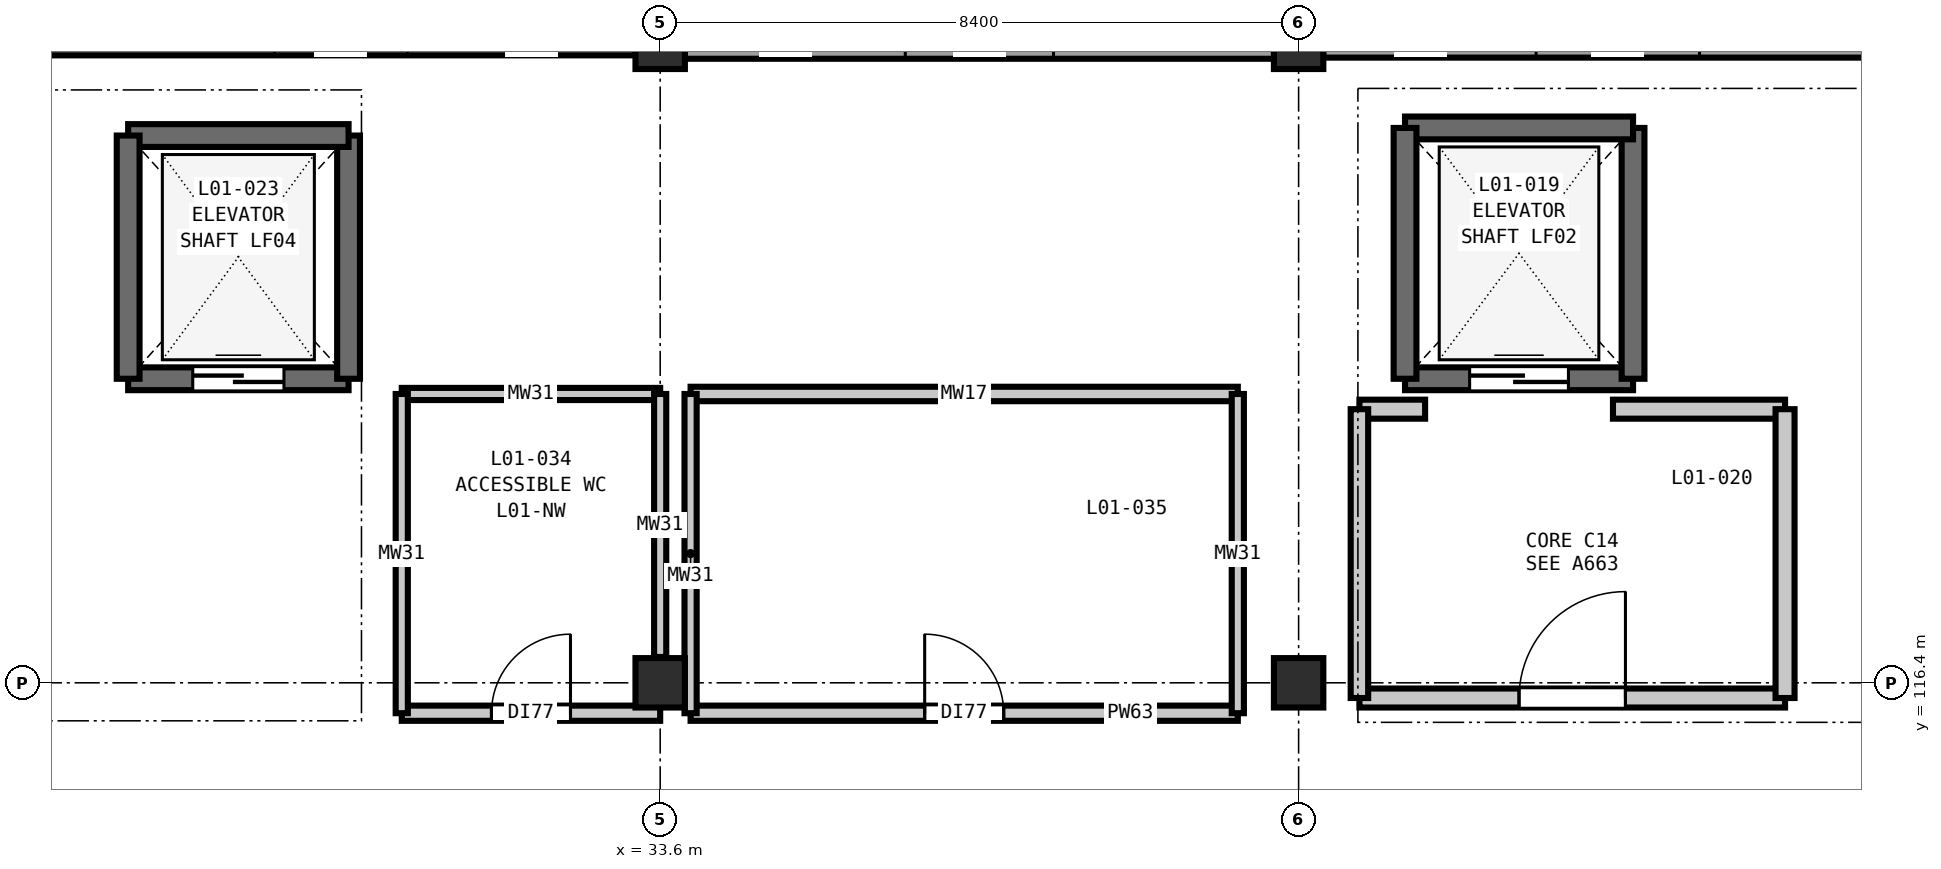
"""IFC4 building model, lengths in metres.
Left out: names, types, materials, properties, quantities, classifications, styles, units other than length and angle.
Written with IfcOpenShell. Run it as: python <this file> out.ifc"""

import sys

from ifc_helpers import new_model, si_unit, direction, frame, frame_2d, origin, origin_2d, place, context, subcontext, project, spatial, rectangle, extrude, element, fill, save


model = new_model("IFC4")
c1 = context("Model", 3, precision=1e-05, world=origin(), true_north=direction((0.0, 1.0)))
c2 = subcontext(c1, "Body", "Model", "MODEL_VIEW")
j1 = project(units=[si_unit("LENGTHUNIT", "METRE"), si_unit("PLANEANGLEUNIT", "RADIAN")], contexts=[c1])
p1 = place(None, origin())
s1 = spatial("IfcSite", under=j1, at=p1, CompositionType="ELEMENT")
p2 = place(p1, origin())
s2 = spatial("IfcBuilding", under=s1, at=p2, CompositionType="ELEMENT")
p3 = place(p2, frame((0.0, 0.0, 5.4)))
s3 = spatial("IfcBuildingStorey", under=s2, at=p3, CompositionType="ELEMENT", Elevation=5.4)
for number, where, z_axis, x_axis in (
    (1, (33.6, 116.4, 0.0), (0.0, 0.0, 1.0), (1.0, 0.0, 0.0)),
    (2, (33.6, 124.8, 0.0), (0.0, 0.0, 1.0), (1.0, 0.0, 0.0)),
    (3, (42.0, 116.4, 0.0), (0.0, 0.0, 1.0), (1.0, 0.0, 0.0)),
    (4, (42.0, 124.8, 0.0), (0.0, 0.0, 1.0), (1.0, 0.0, 0.0)),
):
    element("IfcColumn", number, at=place(p3, frame(where, z_axis=z_axis, x_axis=x_axis)), inside=s3, PredefinedType="COLUMN", context=c2, shape_type="SweptSolid", body=[
        extrude(rectangle(XDim=0.65, YDim=0.65, at=origin_2d()), origin(), (0.0, 0.0, 1.0), 5.4),
    ])
p4 = place(p3, frame((25.523, 124.8, 0.0), z_axis=(0.0, 0.0, 1.0), x_axis=(1.0, 0.0, 0.0)))
e5 = element("IfcWall", 5, at=p4, inside=s3, PredefinedType="SOLIDWALL", context=c2, shape_type="SweptSolid", body=[
    extrude(rectangle(XDim=7.754, YDim=0.29, at=frame_2d((3.877, 0.0))), origin(), (0.0, 0.0, 1.0), 4.68),
])
p5 = place(p4, frame((3.002, 0.0, 0.9)))
e6 = element("IfcOpeningElement", 6, at=p5, cuts=e5, PredefinedType="OPENING", context=c2, shape_type="SweptSolid", body=[
    extrude(rectangle(XDim=1.75, YDim=1.75, at=frame_2d((0.875, 0.875))), frame((0.0, 0.155, 0.0), z_axis=(0.0, -1.0, 0.0), x_axis=(1.0, 0.0, 0.0)), (0.0, 0.0, 1.0), 0.31),
])
p6 = place(p3, frame((33.923, 124.8, 0.0), z_axis=(0.0, 0.0, 1.0), x_axis=(1.0, 0.0, 0.0)))
e7 = element("IfcWall", 7, at=p6, inside=s3, PredefinedType="SOLIDWALL", context=c2, shape_type="SweptSolid", body=[
    extrude(rectangle(XDim=7.754, YDim=0.38, at=frame_2d((3.877, 0.0))), origin(), (0.0, 0.0, 1.0), 4.68),
])
p7 = place(p6, frame((2.902, 0.0, 0.9)))
e8 = element("IfcOpeningElement", 8, at=p7, cuts=e7, PredefinedType="OPENING", context=c2, shape_type="SweptSolid", body=[
    extrude(rectangle(XDim=1.95, YDim=1.75, at=frame_2d((0.975, 0.875))), frame((0.0, 0.2, 0.0), z_axis=(0.0, -1.0, 0.0), x_axis=(1.0, 0.0, 0.0)), (0.0, 0.0, 1.0), 0.4),
])
p8 = place(p3, frame((42.323, 124.8, 0.0), z_axis=(0.0, 0.0, 1.0), x_axis=(1.0, 0.0, 0.0)))
e9 = element("IfcWall", 9, at=p8, inside=s3, PredefinedType="SOLIDWALL", context=c2, shape_type="SweptSolid", body=[
    extrude(rectangle(XDim=7.754, YDim=0.35, at=frame_2d((3.877, 0.0))), origin(), (0.0, 0.0, 1.0), 4.68),
])
p9 = place(p8, frame((2.802, 0.0, 0.9)))
e10 = element("IfcOpeningElement", 10, at=p9, cuts=e9, PredefinedType="OPENING", context=c2, shape_type="SweptSolid", body=[
    extrude(rectangle(XDim=2.15, YDim=1.75, at=frame_2d((1.075, 0.875))), frame((0.0, 0.185, 0.0), z_axis=(0.0, -1.0, 0.0), x_axis=(1.0, 0.0, 0.0)), (0.0, 0.0, 1.0), 0.37),
])
p10 = place(p3, frame((43.4, 120.4, 0.0), z_axis=(0.0, 0.0, 1.0), x_axis=(1.0, 0.0, 0.0)))
e11 = element("IfcWall", 11, at=p10, inside=s3, PredefinedType="SHEAR", context=c2, shape_type="SweptSolid", body=[
    extrude(rectangle(XDim=3.0, YDim=0.3, at=frame_2d((1.5, 0.0))), origin(), (0.0, 0.0, 1.0), 5.4),
])
p11 = place(p10, frame((0.85, 0.0, 0.0)))
e12 = element("IfcOpeningElement", 12, at=p11, cuts=e11, PredefinedType="OPENING", context=c2, shape_type="SweptSolid", body=[
    extrude(rectangle(XDim=1.3, YDim=2.2, at=frame_2d((0.65, 1.1))), frame((0.0, 0.16, 0.0), z_axis=(0.0, -1.0, 0.0), x_axis=(1.0, 0.0, 0.0)), (0.0, 0.0, 1.0), 0.32),
])
p12 = place(p3, frame((46.4, 120.4, 0.0), z_axis=(0.0, 0.0, 1.0), x_axis=(0.0, 1.0, 0.0)))
e13 = element("IfcWall", 13, at=p12, inside=s3, PredefinedType="SHEAR", context=c2, shape_type="SweptSolid", body=[
    extrude(rectangle(XDim=3.3, YDim=0.3, at=frame_2d((1.65, 0.0))), origin(), (0.0, 0.0, 1.0), 5.4),
])
p13 = place(p3, frame((46.4, 123.7, 0.0), z_axis=(0.0, 0.0, 1.0), x_axis=(-1.0, 0.0, 0.0)))
e14 = element("IfcWall", 14, at=p13, inside=s3, PredefinedType="SHEAR", context=c2, shape_type="SweptSolid", body=[
    extrude(rectangle(XDim=3.0, YDim=0.3, at=frame_2d((1.5, 0.0))), origin(), (0.0, 0.0, 1.0), 5.4),
])
p14 = place(p3, frame((43.4, 123.7, 0.0), z_axis=(0.0, 0.0, 1.0), x_axis=(0.0, -1.0, 0.0)))
e15 = element("IfcWall", 15, at=p14, inside=s3, PredefinedType="SHEAR", context=c2, shape_type="SweptSolid", body=[
    extrude(rectangle(XDim=3.3, YDim=0.3, at=frame_2d((1.65, 0.0))), origin(), (0.0, 0.0, 1.0), 5.4),
])
p15 = place(p3, frame((26.6, 120.4, 0.0), z_axis=(0.0, 0.0, 1.0), x_axis=(1.0, 0.0, 0.0)))
e16 = element("IfcWall", 16, at=p15, inside=s3, PredefinedType="SHEAR", context=c2, shape_type="SweptSolid", body=[
    extrude(rectangle(XDim=2.9, YDim=0.3, at=frame_2d((1.45, 0.0))), origin(), (0.0, 0.0, 1.0), 5.4),
])
p16 = place(p15, frame((0.85, 0.0, 0.0)))
e17 = element("IfcOpeningElement", 17, at=p16, cuts=e16, PredefinedType="OPENING", context=c2, shape_type="SweptSolid", body=[
    extrude(rectangle(XDim=1.2, YDim=2.2, at=frame_2d((0.6, 1.1))), frame((0.0, 0.16, 0.0), z_axis=(0.0, -1.0, 0.0), x_axis=(1.0, 0.0, 0.0)), (0.0, 0.0, 1.0), 0.32),
])
p17 = place(p3, frame((29.5, 120.4, 0.0), z_axis=(0.0, 0.0, 1.0), x_axis=(0.0, 1.0, 0.0)))
e18 = element("IfcWall", 18, at=p17, inside=s3, PredefinedType="SHEAR", context=c2, shape_type="SweptSolid", body=[
    extrude(rectangle(XDim=3.2, YDim=0.3, at=frame_2d((1.6, 0.0))), origin(), (0.0, 0.0, 1.0), 5.4),
])
p18 = place(p3, frame((29.5, 123.6, 0.0), z_axis=(0.0, 0.0, 1.0), x_axis=(-1.0, 0.0, 0.0)))
e19 = element("IfcWall", 19, at=p18, inside=s3, PredefinedType="SHEAR", context=c2, shape_type="SweptSolid", body=[
    extrude(rectangle(XDim=2.9, YDim=0.3, at=frame_2d((1.45, 0.0))), origin(), (0.0, 0.0, 1.0), 5.4),
])
p19 = place(p3, frame((26.6, 123.6, 0.0), z_axis=(0.0, 0.0, 1.0), x_axis=(0.0, -1.0, 0.0)))
e20 = element("IfcWall", 20, at=p19, inside=s3, PredefinedType="SHEAR", context=c2, shape_type="SweptSolid", body=[
    extrude(rectangle(XDim=3.2, YDim=0.3, at=frame_2d((1.6, 0.0))), origin(), (0.0, 0.0, 1.0), 5.4),
])
p20 = place(p3, frame((30.2, 116.0, 0.0), z_axis=(0.0, 0.0, 1.0), x_axis=(1.0, 0.0, 0.0)))
e21 = element("IfcWall", 21, at=p20, inside=s3, PredefinedType="PARTITIONING", context=c2, shape_type="SweptSolid", body=[
    extrude(rectangle(XDim=3.4, YDim=0.2, at=frame_2d((1.7, 0.0))), origin(), (0.0, 0.0, 1.0), 5.05),
])
p21 = place(p20, frame((1.18, 0.0, 0.0)))
e22 = element("IfcOpeningElement", 22, at=p21, cuts=e21, PredefinedType="OPENING", context=c2, shape_type="SweptSolid", body=[
    extrude(rectangle(XDim=1.04, YDim=2.1, at=frame_2d((0.52, 1.05))), frame((0.0, 0.11, 0.0), z_axis=(0.0, -1.0, 0.0), x_axis=(1.0, 0.0, 0.0)), (0.0, 0.0, 1.0), 0.22),
])
p22 = place(p3, frame((34.0, 116.0, 0.0), z_axis=(0.0, 0.0, 1.0), x_axis=(1.0, 0.0, 0.0)))
e23 = element("IfcWall", 23, at=p22, inside=s3, PredefinedType="PARTITIONING", context=c2, shape_type="SweptSolid", body=[
    extrude(rectangle(XDim=7.2, YDim=0.2, at=frame_2d((3.6, 0.0))), origin(), (0.0, 0.0, 1.0), 5.05),
])
p23 = place(p22, frame((3.08, 0.0, 0.0)))
e24 = element("IfcOpeningElement", 24, at=p23, cuts=e23, PredefinedType="OPENING", context=c2, shape_type="SweptSolid", body=[
    extrude(rectangle(XDim=1.04, YDim=2.1, at=frame_2d((0.52, 1.05))), frame((0.0, 0.11, 0.0), z_axis=(0.0, -1.0, 0.0), x_axis=(1.0, 0.0, 0.0)), (0.0, 0.0, 1.0), 0.22),
])
p24 = place(p3, frame((42.8, 116.2, 0.0), z_axis=(0.0, 0.0, 1.0), x_axis=(1.0, 0.0, 0.0)))
e25 = element("IfcWall", 25, at=p24, inside=s3, PredefinedType="PARTITIONING", context=c2, shape_type="SweptSolid", body=[
    extrude(rectangle(XDim=5.6, YDim=0.25, at=frame_2d((2.8, 0.0))), origin(), (0.0, 0.0, 1.0), 4.685),
])
p25 = place(p24, frame((2.1, 0.0, 0.0)))
e26 = element("IfcOpeningElement", 26, at=p25, cuts=e25, PredefinedType="OPENING", context=c2, shape_type="SweptSolid", body=[
    extrude(rectangle(XDim=1.4, YDim=2.2, at=frame_2d((0.7, 1.1))), frame((0.0, 0.135, 0.0), z_axis=(0.0, -1.0, 0.0), x_axis=(1.0, 0.0, 0.0)), (0.0, 0.0, 1.0), 0.27),
])
p26 = place(p3, frame((46.136, 120.0, 0.0), z_axis=(0.0, 0.0, 1.0), x_axis=(1.0, 0.0, 0.0)))
e27 = element("IfcWall", 27, at=p26, inside=s3, PredefinedType="PARTITIONING", context=c2, shape_type="SweptSolid", body=[
    extrude(rectangle(XDim=2.264, YDim=0.25, at=frame_2d((1.132, 0.0))), origin(), (0.0, 0.0, 1.0), 5.05),
])
p27 = place(p3, frame((42.8, 120.0, 0.0), z_axis=(0.0, 0.0, 1.0), x_axis=(1.0, 0.0, 0.0)))
e28 = element("IfcWall", 28, at=p27, inside=s3, PredefinedType="PARTITIONING", context=c2, shape_type="SweptSolid", body=[
    extrude(rectangle(XDim=0.864, YDim=0.25, at=frame_2d((0.432, 0.0))), origin(), (0.0, 0.0, 1.0), 5.05),
])
p28 = place(p3, frame((30.2, 120.2, 0.0), z_axis=(0.0, 0.0, 1.0), x_axis=(1.0, 0.0, 0.0)))
e29 = element("IfcWall", 29, at=p28, inside=s3, PredefinedType="PLUMBINGWALL", context=c2, shape_type="SweptSolid", body=[
    extrude(rectangle(XDim=3.4, YDim=0.16, at=frame_2d((1.7, 0.0))), origin(), (0.0, 0.0, 1.0), 5.05),
])
p29 = place(p3, frame((34.0, 120.2, 0.0), z_axis=(0.0, 0.0, 1.0), x_axis=(1.0, 0.0, 0.0)))
e30 = element("IfcWall", 30, at=p29, inside=s3, PredefinedType="PLUMBINGWALL", context=c2, shape_type="SweptSolid", body=[
    extrude(rectangle(XDim=7.2, YDim=0.19, at=frame_2d((3.6, 0.0))), origin(), (0.0, 0.0, 1.0), 5.05),
])
p30 = place(p3, frame((30.2, 116.0, 0.0), z_axis=(0.0, 0.0, 1.0), x_axis=(0.0, 1.0, 0.0)))
e31 = element("IfcWall", 31, at=p30, inside=s3, PredefinedType="PLUMBINGWALL", context=c2, shape_type="SweptSolid", body=[
    extrude(rectangle(XDim=4.2, YDim=0.16, at=frame_2d((2.1, 0.0))), origin(), (0.0, 0.0, 1.0), 5.05),
])
p31 = place(p3, frame((33.6, 116.74, 0.0), z_axis=(0.0, 0.0, 1.0), x_axis=(0.0, 1.0, 0.0)))
e32 = element("IfcWall", 32, at=p31, inside=s3, PredefinedType="PLUMBINGWALL", context=c2, shape_type="SweptSolid", body=[
    extrude(rectangle(XDim=3.46, YDim=0.16, at=frame_2d((1.73, 0.0))), origin(), (0.0, 0.0, 1.0), 4.735),
])
for number, where, z_axis, x_axis in (
    (33, (34.0, 116.0, 0.0), (0.0, 0.0, 1.0), (0.0, 1.0, 0.0)),
    (34, (41.2, 116.0, 0.0), (0.0, 0.0, 1.0), (0.0, 1.0, 0.0)),
):
    element("IfcWall", number, at=place(p3, frame(where, z_axis=z_axis, x_axis=x_axis)), inside=s3, PredefinedType="PLUMBINGWALL", context=c2, shape_type="SweptSolid", body=[
        extrude(rectangle(XDim=4.2, YDim=0.16, at=frame_2d((2.1, 0.0))), origin(), (0.0, 0.0, 1.0), 5.05),
    ])
p32 = place(p3, frame((42.8, 116.2, 0.0), z_axis=(0.0, 0.0, 1.0), x_axis=(0.0, 1.0, 0.0)))
e35 = element("IfcWall", 35, at=p32, inside=s3, PredefinedType="PARTITIONING", context=c2, shape_type="SweptSolid", body=[
    extrude(rectangle(XDim=3.8, YDim=0.23, at=frame_2d((1.9, 0.0))), origin(), (0.0, 0.0, 1.0), 5.05),
])
p33 = place(p3, frame((48.4, 116.2, 0.0), z_axis=(0.0, 0.0, 1.0), x_axis=(0.0, 1.0, 0.0)))
e36 = element("IfcWall", 36, at=p33, inside=s3, PredefinedType="PARTITIONING", context=c2, shape_type="SweptSolid", body=[
    extrude(rectangle(XDim=3.8, YDim=0.25, at=frame_2d((1.9, 0.0))), origin(), (0.0, 0.0, 1.0), 5.05),
])
p34 = place(p11, origin())
e37 = element("IfcDoor", 37, at=p34, inside=s3, OperationType="DOUBLE_DOOR_SLIDING", PredefinedType="DOOR", context=c2, shape_type="SweptSolid", body=[
    extrude(rectangle(XDim=1.3, YDim=2.2, at=frame_2d((0.65, 1.1))), frame((0.0, 0.025, 0.0), z_axis=(0.0, -1.0, 0.0), x_axis=(1.0, 0.0, 0.0)), (0.0, 0.0, 1.0), 0.05),
])
fill(e12, e37)
p35 = place(p16, origin())
e38 = element("IfcDoor", 38, at=p35, inside=s3, OperationType="DOUBLE_DOOR_SLIDING", PredefinedType="DOOR", context=c2, shape_type="SweptSolid", body=[
    extrude(rectangle(XDim=1.2, YDim=2.2, at=frame_2d((0.6, 1.1))), frame((0.0, 0.025, 0.0), z_axis=(0.0, -1.0, 0.0), x_axis=(1.0, 0.0, 0.0)), (0.0, 0.0, 1.0), 0.05),
])
fill(e17, e38)
p36 = place(p21, origin())
e39 = element("IfcDoor", 39, at=p36, inside=s3, OperationType="SINGLE_SWING_RIGHT", PredefinedType="DOOR", context=c2, shape_type="SweptSolid", body=[
    extrude(rectangle(XDim=1.04, YDim=2.1, at=frame_2d((0.52, 1.05))), frame((0.0, 0.025, 0.0), z_axis=(0.0, -1.0, 0.0), x_axis=(1.0, 0.0, 0.0)), (0.0, 0.0, 1.0), 0.05),
])
fill(e22, e39)
p37 = place(p23, origin())
e40 = element("IfcDoor", 40, at=p37, inside=s3, OperationType="SINGLE_SWING_LEFT", PredefinedType="DOOR", context=c2, shape_type="SweptSolid", body=[
    extrude(rectangle(XDim=1.04, YDim=2.1, at=frame_2d((0.52, 1.05))), frame((0.0, 0.025, 0.0), z_axis=(0.0, -1.0, 0.0), x_axis=(1.0, 0.0, 0.0)), (0.0, 0.0, 1.0), 0.05),
])
fill(e24, e40)
p38 = place(p25, origin())
e41 = element("IfcDoor", 41, at=p38, inside=s3, OperationType="SINGLE_SWING_RIGHT", PredefinedType="DOOR", context=c2, shape_type="SweptSolid", body=[
    extrude(rectangle(XDim=1.4, YDim=2.2, at=frame_2d((0.7, 1.1))), frame((0.0, 0.025, 0.0), z_axis=(0.0, -1.0, 0.0), x_axis=(1.0, 0.0, 0.0)), (0.0, 0.0, 1.0), 0.05),
])
fill(e26, e41)
save(model, sys.argv[1])
